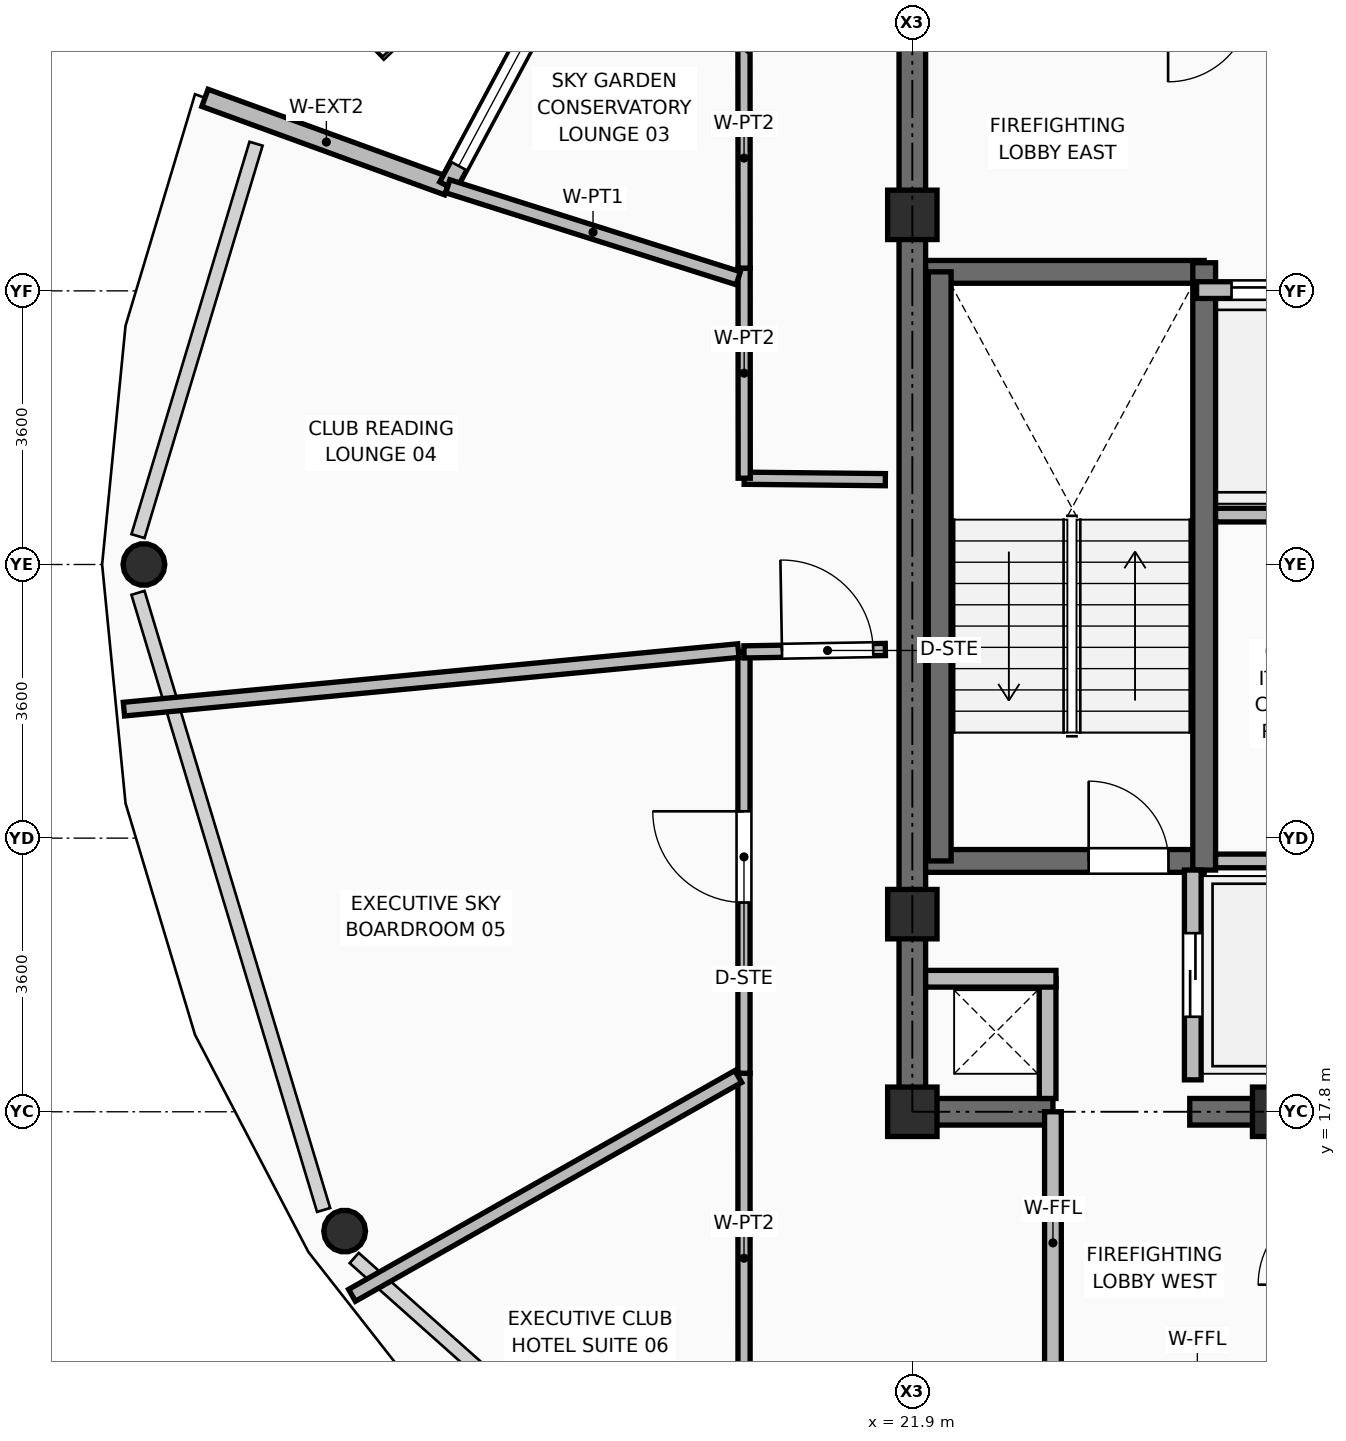
"""IFC4 building model, lengths in metres.
Left out: names, types, materials, properties, quantities, classifications, styles, units other than length and angle.
Written with IfcOpenShell. Run it as: python <this file> out.ifc"""

import sys

from ifc_helpers import new_model, si_unit, direction, frame, frame_2d, origin, origin_2d, place, context, subcontext, project, spatial, rectangle, hollow_circle, extrude, element, fill, save


model = new_model("IFC4")
c1 = context("Model", 3, precision=1e-05, world=origin(), true_north=direction((0.0, 1.0)))
c2 = subcontext(c1, "Body", "Model", "MODEL_VIEW")
j1 = project(units=[si_unit("LENGTHUNIT", "METRE"), si_unit("PLANEANGLEUNIT", "RADIAN")], contexts=[c1])
p1 = place(None, origin())
s1 = spatial("IfcSite", under=j1, at=p1, CompositionType="ELEMENT")
p2 = place(p1, origin())
s2 = spatial("IfcBuilding", under=s1, at=p2, CompositionType="ELEMENT")
p3 = place(p2, frame((0.0, 0.0, 271.35)))
s3 = spatial("IfcBuildingStorey", under=s2, at=p3, CompositionType="ELEMENT", Elevation=271.35)
for number, where, z_axis, x_axis in (
    (1, (21.9, 17.8, 0.0), (0.0, 0.0, 1.0), (1.0, 0.0, 0.0)),
    (2, (26.7, 17.8, 0.0), (0.0, 0.0, 1.0), (1.0, 0.0, 0.0)),
    (3, (21.9, 20.4, 0.0), (0.0, 0.0, 1.0), (1.0, 0.0, 0.0)),
    (4, (21.9, 29.6, 0.0), (0.0, 0.0, 1.0), (1.0, 0.0, 0.0)),
):
    element("IfcColumn", number, at=place(p3, frame(where, z_axis=z_axis, x_axis=x_axis)), inside=s3, PredefinedType="COLUMN", context=c2, shape_type="SweptSolid", body=[
        extrude(rectangle(XDim=0.65, YDim=0.65, at=origin_2d()), origin(), (0.0, 0.0, 1.0), 3.75),
    ])
p4 = place(p3, frame((11.79, 25.0, 0.0), z_axis=(0.022426310188, 0.0, 0.999748498679), x_axis=(0.0, 1.0, 0.0)))
e5 = element("IfcColumn", 5, at=p4, inside=s3, PredefinedType="COLUMN", context=c2, shape_type="SweptSolid", body=[
    extrude(hollow_circle(Radius=0.275, WallThickness=0.025, at=origin_2d()), origin(), (0.0, 0.0, 1.0), 3.571),
])
p5 = place(p3, frame((14.431, 16.23, 0.0), z_axis=(0.019349782702, 0.010119320989, 0.9997615642), x_axis=(-0.463421877407, 0.886137779096, 0.0)))
e6 = element("IfcColumn", 6, at=p5, inside=s3, PredefinedType="COLUMN", context=c2, shape_type="SweptSolid", body=[
    extrude(hollow_circle(Radius=0.275, WallThickness=0.025, at=origin_2d()), origin(), (0.0, 0.0, 1.0), 3.571),
])
p6 = place(p3, frame((15.788, 29.976, 0.0), z_axis=(0.0, 0.0, 1.0), x_axis=(-0.939699046647, 0.342002487902, 0.0)))
e7 = element("IfcWall", 7, at=p6, inside=s3, PredefinedType="SOLIDWALL", context=c2, shape_type="SweptSolid", body=[
    extrude(rectangle(XDim=3.4, YDim=0.24, at=frame_2d((1.7, 0.0))), origin(), (0.0, 0.0, 1.0), 3.57),
])
p7 = place(p3, frame((17.02, 32.274, 0.0), z_axis=(0.0, 0.0, 1.0), x_axis=(-0.472502026954, -0.881329583371, 0.0)))
e8 = element("IfcWall", 8, at=p7, inside=s3, PredefinedType="SOLIDWALL", context=c2, shape_type="SweptSolid", body=[
    extrude(rectangle(XDim=2.607, YDim=0.24, at=frame_2d((1.304, 0.0))), origin(), (0.0, 0.0, 1.0), 3.57),
])
p8 = place(p7, frame((0.304, 0.0, 0.85)))
e9 = element("IfcOpeningElement", 9, at=p8, cuts=e8, PredefinedType="OPENING", context=c2, shape_type="SweptSolid", body=[
    extrude(rectangle(XDim=2.0, YDim=2.4, at=frame_2d((1.0, 1.2))), frame((0.0, 0.13, 0.0), z_axis=(0.0, -1.0, 0.0), x_axis=(1.0, 0.0, 0.0)), (0.0, 0.0, 1.0), 0.26),
])
p9 = place(p3, frame((21.725, 17.8, 0.0), z_axis=(0.0, 0.0, 1.0), x_axis=(1.0, 0.0, 0.0)))
e10 = element("IfcWall", 10, at=p9, inside=s3, PredefinedType="SHEAR", context=c2, shape_type="SweptSolid", body=[
    extrude(rectangle(XDim=2.025, YDim=0.35, at=frame_2d((1.012, 0.0))), origin(), (0.0, 0.0, 1.0), 3.57),
])
p10 = place(p3, frame((25.55, 17.8, 0.0), z_axis=(0.0, 0.0, 1.0), x_axis=(1.0, 0.0, 0.0)))
e11 = element("IfcWall", 11, at=p10, inside=s3, PredefinedType="SHEAR", context=c2, shape_type="SweptSolid", body=[
    extrude(rectangle(XDim=6.9, YDim=0.35, at=frame_2d((3.45, 0.0))), origin(), (0.0, 0.0, 1.0), 3.57),
])
p11 = place(p3, frame((21.9, 17.975, 0.0), z_axis=(0.0, 0.0, 1.0), x_axis=(0.0, 1.0, 0.0)))
e12 = element("IfcWall", 12, at=p11, inside=s3, PredefinedType="SHEAR", context=c2, shape_type="SweptSolid", body=[
    extrude(rectangle(XDim=14.3, YDim=0.35, at=frame_2d((7.15, 0.0))), origin(), (0.0, 0.0, 1.0), 3.57),
])
p12 = place(p3, frame((22.075, 21.1, 0.0), z_axis=(0.0, 0.0, 1.0), x_axis=(1.0, 0.0, 0.0)))
e13 = element("IfcWall", 13, at=p12, inside=s3, PredefinedType="SHEAR", context=c2, shape_type="SweptSolid", body=[
    extrude(rectangle(XDim=3.665, YDim=0.3, at=frame_2d((1.833, 0.0))), origin(), (0.0, 0.0, 1.0), 3.57),
])
p13 = place(p12, frame((2.145, 0.0, 0.0)))
e14 = element("IfcOpeningElement", 14, at=p13, cuts=e13, PredefinedType="OPENING", context=c2, shape_type="SweptSolid", body=[
    extrude(rectangle(XDim=1.05, YDim=2.1, at=frame_2d((0.525, 1.05))), frame((0.0, 0.16, 0.0), z_axis=(0.0, -1.0, 0.0), x_axis=(1.0, 0.0, 0.0)), (0.0, 0.0, 1.0), 0.32),
])
p14 = place(p3, frame((22.075, 28.85, 0.0), z_axis=(0.0, 0.0, 1.0), x_axis=(1.0, 0.0, 0.0)))
e15 = element("IfcWall", 15, at=p14, inside=s3, PredefinedType="SHEAR", context=c2, shape_type="SweptSolid", body=[
    extrude(rectangle(XDim=3.665, YDim=0.3, at=frame_2d((1.833, 0.0))), origin(), (0.0, 0.0, 1.0), 3.57),
])
p15 = place(p3, frame((25.74, 20.98, 0.0), z_axis=(0.0, 0.0, 1.0), x_axis=(0.0, 1.0, 0.0)))
e16 = element("IfcWall", 16, at=p15, inside=s3, PredefinedType="SHEAR", context=c2, shape_type="SweptSolid", body=[
    extrude(rectangle(XDim=7.99, YDim=0.3, at=frame_2d((3.995, 0.0))), origin(), (0.0, 0.0, 1.0), 3.57),
])
p16 = place(p3, frame((22.26, 21.1, 0.0), z_axis=(0.0, 0.0, 1.0), x_axis=(0.0, 1.0, 0.0)))
e17 = element("IfcWall", 17, at=p16, inside=s3, PredefinedType="SHEAR", context=c2, shape_type="SweptSolid", body=[
    extrude(rectangle(XDim=7.75, YDim=0.3, at=frame_2d((3.875, 0.0))), origin(), (0.0, 0.0, 1.0), 3.57),
])
p17 = place(p3, frame((23.68, 17.975, 0.0), z_axis=(0.0, 0.0, 1.0), x_axis=(0.0, 1.0, 0.0)))
e18 = element("IfcWall", 18, at=p17, inside=s3, PredefinedType="PARTITIONING", context=c2, shape_type="SweptSolid", body=[
    extrude(rectangle(XDim=1.575, YDim=0.22, at=frame_2d((0.788, 0.0))), origin(), (0.0, 0.0, 1.0), 3.132),
])
p18 = place(p3, frame((22.075, 19.55, 0.0), z_axis=(0.0, 0.0, 1.0), x_axis=(1.0, 0.0, 0.0)))
e19 = element("IfcWall", 19, at=p18, inside=s3, PredefinedType="PARTITIONING", context=c2, shape_type="SweptSolid", body=[
    extrude(rectangle(XDim=1.715, YDim=0.22, at=frame_2d((0.857, 0.0))), origin(), (0.0, 0.0, 1.0), 2.595),
])
p19 = place(p3, frame((25.59, 18.22, 0.0), z_axis=(0.0, 0.0, 1.0), x_axis=(0.0, 1.0, 0.0)))
e20 = element("IfcWall", 20, at=p19, inside=s3, PredefinedType="PARTITIONING", context=c2, shape_type="SweptSolid", body=[
    extrude(rectangle(XDim=2.76, YDim=0.22, at=frame_2d((1.38, 0.0))), origin(), (0.0, 0.0, 1.0), 3.55),
])
p20 = place(p19, frame((0.83, 0.0, 0.0)))
e21 = element("IfcOpeningElement", 21, at=p20, cuts=e20, PredefinedType="OPENING", context=c2, shape_type="SweptSolid", body=[
    extrude(rectangle(XDim=1.1, YDim=2.2, at=frame_2d((0.55, 1.1))), frame((0.0, 0.12, 0.0), z_axis=(0.0, -1.0, 0.0), x_axis=(1.0, 0.0, 0.0)), (0.0, 0.0, 1.0), 0.24),
])
p21 = place(p3, frame((25.64, 28.61, 0.0), z_axis=(0.0, 0.0, 1.0), x_axis=(1.0, 0.0, 0.0)))
e22 = element("IfcWall", 22, at=p21, inside=s3, PredefinedType="PARTITIONING", context=c2, shape_type="SweptSolid", body=[
    extrude(rectangle(XDim=2.02, YDim=0.22, at=frame_2d((1.01, 0.0))), origin(), (0.0, 0.0, 1.0), 3.55),
])
p22 = place(p21, frame((0.46, 0.0, 0.0)))
e23 = element("IfcOpeningElement", 23, at=p22, cuts=e22, PredefinedType="OPENING", context=c2, shape_type="SweptSolid", body=[
    extrude(rectangle(XDim=1.1, YDim=2.2, at=frame_2d((0.55, 1.1))), frame((0.0, 0.12, 0.0), z_axis=(0.0, -1.0, 0.0), x_axis=(1.0, 0.0, 0.0)), (0.0, 0.0, 1.0), 0.24),
])
for number, where, z_axis, x_axis in (
    (24, (25.89, 21.1, 0.0), (0.0, 0.0, 1.0), (1.0, 0.0, 0.0)),
    (25, (25.89, 25.65, 0.0), (0.0, 0.0, 1.0), (1.0, 0.0, 0.0)),
):
    element("IfcWall", number, at=place(p3, frame(where, z_axis=z_axis, x_axis=x_axis)), inside=s3, PredefinedType="PARTITIONING", context=c2, shape_type="SweptSolid", body=[
        extrude(rectangle(XDim=1.7, YDim=0.18, at=frame_2d((0.85, 0.0))), origin(), (0.0, 0.0, 1.0), 3.55),
    ])
p23 = place(p3, frame((23.75, 14.35, 0.0), z_axis=(0.0, 0.0, 1.0), x_axis=(0.0, 1.0, 0.0)))
e26 = element("IfcWall", 26, at=p23, inside=s3, PredefinedType="PARTITIONING", context=c2, shape_type="SweptSolid", body=[
    extrude(rectangle(XDim=3.45, YDim=0.22, at=frame_2d((1.725, 0.0))), origin(), (0.0, 0.0, 1.0), 3.132),
])
p24 = place(p3, frame((21.545, 26.116, 0.0), z_axis=(0.0, 0.0, 1.0), x_axis=(-0.999947421001, 0.010254522592, 0.0)))
e27 = element("IfcWall", 27, at=p24, inside=s3, PredefinedType="PARTITIONING", context=c2, shape_type="SweptSolid", body=[
    extrude(rectangle(XDim=1.857, YDim=0.16, at=frame_2d((0.928, 0.0))), origin(), (0.0, 0.0, 1.0), 2.595),
])
p25 = place(p3, frame((19.688, 26.135, 0.0), z_axis=(0.0, 0.0, 1.0), x_axis=(-0.000353325656, 0.99999993758, 0.0)))
e28 = element("IfcWall", 28, at=p25, inside=s3, PredefinedType="PARTITIONING", context=c2, shape_type="SweptSolid", body=[
    extrude(rectangle(XDim=2.764, YDim=0.16, at=frame_2d((1.382, 0.0))), origin(), (0.0, 0.0, 1.0), 3.55),
])
p26 = place(p3, frame((19.687, 28.899, 0.0), z_axis=(0.0, 0.0, 1.0), x_axis=(-0.000674649872, 0.999999772424, 0.0)))
e29 = element("IfcWall", 29, at=p26, inside=s3, PredefinedType="PARTITIONING", context=c2, shape_type="SweptSolid", body=[
    extrude(rectangle(XDim=2.895, YDim=0.16, at=frame_2d((1.448, 0.0))), origin(), (0.0, 0.0, 1.0), 3.55),
])
p27 = place(p3, frame((19.686, 13.44, 0.0), z_axis=(0.0, 0.0, 1.0), x_axis=(-0.000200652115, 0.999999979869, 0.0)))
e30 = element("IfcWall", 30, at=p27, inside=s3, PredefinedType="PARTITIONING", context=c2, shape_type="SweptSolid", body=[
    extrude(rectangle(XDim=4.867, YDim=0.16, at=frame_2d((2.434, 0.0))), origin(), (0.0, 0.0, 1.0), 3.132),
])
p28 = place(p3, frame((19.685, 18.307, 0.0), z_axis=(0.0, 0.0, 1.0), x_axis=(0.0, 1.0, 0.0)))
e31 = element("IfcWall", 31, at=p28, inside=s3, PredefinedType="PARTITIONING", context=c2, shape_type="SweptSolid", body=[
    extrude(rectangle(XDim=5.543, YDim=0.16, at=frame_2d((2.771, 0.0))), origin(), (0.0, 0.0, 1.0), 3.132),
])
p29 = place(p28, frame((2.246, 0.0, 0.0)))
e32 = element("IfcOpeningElement", 32, at=p29, cuts=e31, PredefinedType="OPENING", context=c2, shape_type="SweptSolid", body=[
    extrude(rectangle(XDim=1.2, YDim=2.1, at=frame_2d((0.6, 1.05))), frame((0.0, 0.09, 0.0), z_axis=(0.0, -1.0, 0.0), x_axis=(1.0, 0.0, 0.0)), (0.0, 0.0, 1.0), 0.18),
])
p30 = place(p3, frame((19.685, 23.85, 0.0), z_axis=(0.0, 0.0, 1.0), x_axis=(0.999852179606, 0.017193572529, 0.0)))
e33 = element("IfcWall", 33, at=p30, inside=s3, PredefinedType="PARTITIONING", context=c2, shape_type="SweptSolid", body=[
    extrude(rectangle(XDim=1.86, YDim=0.16, at=frame_2d((0.93, 0.0))), origin(), (0.0, 0.0, 1.0), 2.595),
])
p31 = place(p30, frame((0.5, 0.0, 0.0)))
e34 = element("IfcOpeningElement", 34, at=p31, cuts=e33, PredefinedType="OPENING", context=c2, shape_type="SweptSolid", body=[
    extrude(rectangle(XDim=1.2, YDim=2.1, at=frame_2d((0.6, 1.05))), frame((0.0, 0.09, 0.0), z_axis=(0.0, -1.0, 0.0), x_axis=(1.0, 0.0, 0.0)), (0.0, 0.0, 1.0), 0.18),
])
p32 = place(p3, frame((19.61, 28.766, 0.0), z_axis=(0.0, 0.0, 1.0), x_axis=(-0.953367052014, 0.301813293502, 0.0)))
e35 = element("IfcWall", 35, at=p32, inside=s3, PredefinedType="PARTITIONING", context=c2, shape_type="SweptSolid", body=[
    extrude(rectangle(XDim=4.009, YDim=0.18, at=frame_2d((2.004, 0.0))), origin(), (0.0, 0.0, 1.0), 3.55),
])
p33 = place(p3, frame((19.611, 23.867, 0.0), z_axis=(0.0, 0.0, 1.0), x_axis=(-0.995494121282, -0.094823280337, 0.0)))
e36 = element("IfcWall", 36, at=p33, inside=s3, PredefinedType="PARTITIONING", context=c2, shape_type="SweptSolid", body=[
    extrude(rectangle(XDim=8.121, YDim=0.18, at=frame_2d((4.06, 0.0))), origin(), (0.0, 0.0, 1.0), 3.003),
])
p34 = place(p3, frame((19.61, 18.264, 0.0), z_axis=(0.0, 0.0, 1.0), x_axis=(-0.870089112565, -0.492894447318, 0.0)))
e37 = element("IfcWall", 37, at=p34, inside=s3, PredefinedType="PARTITIONING", context=c2, shape_type="SweptSolid", body=[
    extrude(rectangle(XDim=5.841, YDim=0.18, at=frame_2d((2.92, 0.0))), origin(), (0.0, 0.0, 1.0), 3.003),
])
p35 = place(p8, origin())
e38 = element("IfcWindow", 38, at=p35, inside=s3, PartitioningType="SINGLE_PANEL", PredefinedType="WINDOW", context=c2, shape_type="SweptSolid", body=[
    extrude(rectangle(XDim=2.0, YDim=2.4, at=frame_2d((1.0, 1.2))), frame((0.0, 0.03, 0.0), z_axis=(0.0, -1.0, 0.0), x_axis=(1.0, 0.0, 0.0)), (0.0, 0.0, 1.0), 0.06),
])
fill(e9, e38)
p36 = place(p13, origin())
e39 = element("IfcDoor", 39, at=p36, inside=s3, OperationType="SINGLE_SWING_LEFT", PredefinedType="DOOR", context=c2, shape_type="SweptSolid", body=[
    extrude(rectangle(XDim=1.05, YDim=2.1, at=frame_2d((0.525, 1.05))), frame((0.0, 0.025, 0.0), z_axis=(0.0, -1.0, 0.0), x_axis=(1.0, 0.0, 0.0)), (0.0, 0.0, 1.0), 0.05),
])
fill(e14, e39)
p37 = place(p20, origin())
e40 = element("IfcDoor", 40, at=p37, inside=s3, OperationType="DOUBLE_DOOR_SLIDING", PredefinedType="DOOR", context=c2, shape_type="SweptSolid", body=[
    extrude(rectangle(XDim=1.1, YDim=2.2, at=frame_2d((0.55, 1.1))), frame((0.0, 0.025, 0.0), z_axis=(0.0, -1.0, 0.0), x_axis=(1.0, 0.0, 0.0)), (0.0, 0.0, 1.0), 0.05),
])
fill(e21, e40)
p38 = place(p22, origin())
e41 = element("IfcDoor", 41, at=p38, inside=s3, OperationType="DOUBLE_DOOR_SLIDING", PredefinedType="DOOR", context=c2, shape_type="SweptSolid", body=[
    extrude(rectangle(XDim=1.1, YDim=2.2, at=frame_2d((0.55, 1.1))), frame((0.0, 0.025, 0.0), z_axis=(0.0, -1.0, 0.0), x_axis=(1.0, 0.0, 0.0)), (0.0, 0.0, 1.0), 0.05),
])
fill(e23, e41)
p39 = place(p31, origin())
e42 = element("IfcDoor", 42, at=p39, inside=s3, OperationType="SINGLE_SWING_LEFT", PredefinedType="DOOR", context=c2, shape_type="SweptSolid", body=[
    extrude(rectangle(XDim=1.2, YDim=2.1, at=frame_2d((0.6, 1.05))), frame((0.0, 0.025, 0.0), z_axis=(0.0, -1.0, 0.0), x_axis=(1.0, 0.0, 0.0)), (0.0, 0.0, 1.0), 0.05),
])
fill(e34, e42)
p40 = place(p29, origin())
e43 = element("IfcDoor", 43, at=p40, inside=s3, OperationType="SINGLE_SWING_RIGHT", PredefinedType="DOOR", context=c2, shape_type="SweptSolid", body=[
    extrude(rectangle(XDim=1.2, YDim=2.1, at=frame_2d((0.6, 1.05))), frame((0.0, 0.025, 0.0), z_axis=(0.0, -1.0, 0.0), x_axis=(1.0, 0.0, 0.0)), (0.0, 0.0, 1.0), 0.05),
])
fill(e32, e43)
save(model, sys.argv[1])
